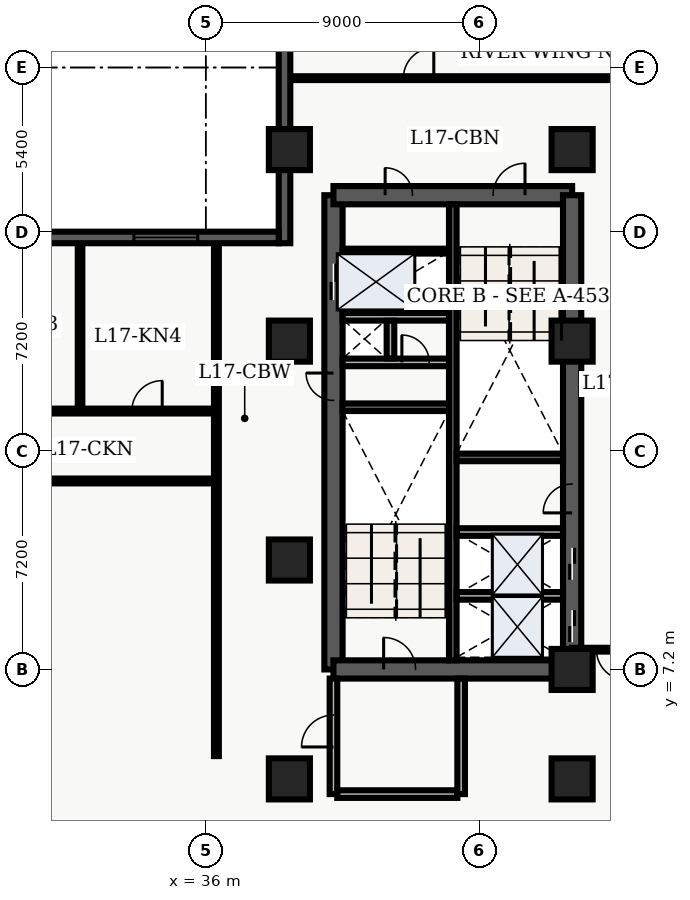
"""IFC4 building model, lengths in metres.
Left out: names, types, materials, properties, quantities, classifications, styles, units other than length and angle.
Written with IfcOpenShell. Run it as: python <this file> out.ifc"""

import sys

from ifc_helpers import new_model, entity, si_unit, converted_unit, direction, frame, origin_with_axes, origin_2d_with_axis, place, context, subcontext, project, spatial, polyline, rectangle, outline, extrude, element, fill, save


model = new_model("IFC4")
c1 = context("Model", 3, precision=1e-05, world=origin_with_axes(), true_north=direction((0.0, 1.0)))
c2 = subcontext(c1, "Body", "Model", "MODEL_VIEW")
j1 = project(units=[si_unit("LENGTHUNIT", "METRE"), converted_unit("PLANEANGLEUNIT", "DEGREE", entity("IfcPlaneAngleMeasure", 0.017), si_unit("PLANEANGLEUNIT", "RADIAN"), dimensions=[0, 0, 0, 0, 0, 0, 0])], contexts=[c1])
p1 = place(None, origin_with_axes())
s1 = spatial("IfcSite", under=j1, at=p1, CompositionType="ELEMENT")
p2 = place(p1, origin_with_axes())
s2 = spatial("IfcBuilding", under=s1, at=p2, CompositionType="ELEMENT")
p3 = place(p2, frame((0.0, 0.0, 71.7), z_axis=(0.0, 0.0, 1.0), x_axis=(1.0, 0.0, 0.0)))
s3 = spatial("IfcBuildingStorey", under=s2, at=p3, CompositionType="ELEMENT", Elevation=71.7)
p4 = place(p3, frame((40.2, 7.2, 0.0), z_axis=(0.0, 0.0, 1.0), x_axis=(0.0, 1.0, 0.0)))
e1 = element("IfcWall", 1, at=p4, inside=s3, PredefinedType="SHEAR", context=c2, shape_type="SweptSolid", body=[
    extrude(outline(polyline([(0.0, -0.3), (15.6, -0.3), (15.6, 0.3), (0.0, 0.3), (0.0, -0.3)])), origin_with_axes(), (0.0, 0.0, 1.0), 3.66),
])
p5 = place(p4, frame((12.75, 0.0, 0.0), z_axis=(0.0, 0.0, 1.0), x_axis=(1.0, 0.0, 0.0)))
e2 = element("IfcOpeningElement", 2, at=p5, cuts=e1, PredefinedType="OPENING", context=c2, shape_type="SweptSolid", body=[
    extrude(rectangle(XDim=1.2, YDim=0.62, at=origin_2d_with_axis()), origin_with_axes(), (0.0, 0.0, 1.0), 2.15),
])
p6 = place(p4, frame((9.3, 0.0, 0.0), z_axis=(0.0, 0.0, 1.0), x_axis=(1.0, 0.0, 0.0)))
e3 = element("IfcOpeningElement", 3, at=p6, cuts=e1, PredefinedType="OPENING", context=c2, shape_type="SweptSolid", body=[
    extrude(rectangle(XDim=0.9, YDim=0.62, at=origin_2d_with_axis()), origin_with_axes(), (0.0, 0.0, 1.0), 2.15),
])
p7 = place(p3, frame((40.2, 7.2, 0.0), z_axis=(0.0, 0.0, 1.0), x_axis=(1.0, 0.0, 0.0)))
e4 = element("IfcWall", 4, at=p7, inside=s3, PredefinedType="SHEAR", context=c2, shape_type="SweptSolid", body=[
    extrude(outline(polyline([(0.0, -0.3), (7.85, -0.3), (7.85, 0.3), (0.0, 0.3), (0.0, -0.3)])), origin_with_axes(), (0.0, 0.0, 1.0), 3.66),
])
p8 = place(p7, frame((2.175, 0.0, 0.0), z_axis=(0.0, 0.0, 1.0), x_axis=(1.0, 0.0, 0.0)))
e5 = element("IfcOpeningElement", 5, at=p8, cuts=e4, PredefinedType="OPENING", context=c2, shape_type="SweptSolid", body=[
    extrude(rectangle(XDim=1.05, YDim=0.62, at=origin_2d_with_axis()), origin_with_axes(), (0.0, 0.0, 1.0), 2.15),
])
p9 = place(p3, frame((40.2, 22.8, 0.0), z_axis=(0.0, 0.0, 1.0), x_axis=(1.0, 0.0, 0.0)))
e6 = element("IfcWall", 6, at=p9, inside=s3, PredefinedType="SHEAR", context=c2, shape_type="SweptSolid", body=[
    extrude(outline(polyline([(0.0, -0.3), (7.85, -0.3), (7.85, 0.3), (0.0, 0.3), (0.0, -0.3)])), origin_with_axes(), (0.0, 0.0, 1.0), 3.66),
])
p10 = place(p9, frame((5.775, 0.0, 0.0), z_axis=(0.0, 0.0, 1.0), x_axis=(1.0, 0.0, 0.0)))
e7 = element("IfcOpeningElement", 7, at=p10, cuts=e6, PredefinedType="OPENING", context=c2, shape_type="SweptSolid", body=[
    extrude(rectangle(XDim=1.05, YDim=0.62, at=origin_2d_with_axis()), origin_with_axes(), (0.0, 0.0, 1.0), 2.15),
])
p11 = place(p9, frame((2.15, 0.0, 0.0), z_axis=(0.0, 0.0, 1.0), x_axis=(1.0, 0.0, 0.0)))
e8 = element("IfcOpeningElement", 8, at=p11, cuts=e6, PredefinedType="OPENING", context=c2, shape_type="SweptSolid", body=[
    extrude(rectangle(XDim=0.9, YDim=0.62, at=origin_2d_with_axis()), origin_with_axes(), (0.0, 0.0, 1.0), 2.15),
])
p12 = place(p3, frame((48.05, 7.2, 0.0), z_axis=(0.0, 0.0, 1.0), x_axis=(0.0, 1.0, 0.0)))
e9 = element("IfcWall", 9, at=p12, inside=s3, PredefinedType="SHEAR", context=c2, shape_type="SweptSolid", body=[
    extrude(outline(polyline([(0.0, -0.3), (15.6, -0.3), (15.6, 0.3), (0.0, 0.3), (0.0, -0.3)])), origin_with_axes(), (0.0, 0.0, 1.0), 3.66),
])
p13 = place(p12, frame((1.425, 0.0, 0.0), z_axis=(0.0, 0.0, 1.0), x_axis=(1.0, 0.0, 0.0)))
e10 = element("IfcOpeningElement", 10, at=p13, cuts=e9, PredefinedType="OPENING", context=c2, shape_type="SweptSolid", body=[
    extrude(rectangle(XDim=1.05, YDim=0.62, at=origin_2d_with_axis()), origin_with_axes(), (0.0, 0.0, 1.0), 2.15),
])
p14 = place(p12, frame((3.475, 0.0, 0.0), z_axis=(0.0, 0.0, 1.0), x_axis=(1.0, 0.0, 0.0)))
e11 = element("IfcOpeningElement", 11, at=p14, cuts=e9, PredefinedType="OPENING", context=c2, shape_type="SweptSolid", body=[
    extrude(rectangle(XDim=1.05, YDim=0.62, at=origin_2d_with_axis()), origin_with_axes(), (0.0, 0.0, 1.0), 2.15),
])
p15 = place(p12, frame((5.625, 0.0, 0.0), z_axis=(0.0, 0.0, 1.0), x_axis=(1.0, 0.0, 0.0)))
e12 = element("IfcOpeningElement", 12, at=p15, cuts=e9, PredefinedType="OPENING", context=c2, shape_type="SweptSolid", body=[
    extrude(rectangle(XDim=0.95, YDim=0.62, at=origin_2d_with_axis()), origin_with_axes(), (0.0, 0.0, 1.0), 2.15),
])
p16 = place(p3, frame((44.125, 7.5, 0.0), z_axis=(0.0, 0.0, 1.0), x_axis=(0.0, 1.0, 0.0)))
e13 = element("IfcWall", 13, at=p16, inside=s3, PredefinedType="SHEAR", context=c2, shape_type="SweptSolid", body=[
    extrude(outline(polyline([(0.0, -0.125), (15.0, -0.125), (15.0, 0.125), (0.0, 0.125), (0.0, -0.125)])), origin_with_axes(), (0.0, 0.0, 1.0), 3.66),
])
for number, where, z_axis, x_axis in (
    (14, (40.5, 15.825, 0.0), (0.0, 0.0, 1.0), (1.0, 0.0, 0.0)),
    (15, (44.25, 14.175, 0.0), (0.0, 0.0, 1.0), (1.0, 0.0, 0.0)),
):
    element("IfcWall", number, at=place(p3, frame(where, z_axis=z_axis, x_axis=x_axis)), inside=s3, PredefinedType="SHEAR", context=c2, shape_type="SweptSolid", body=[
        extrude(outline(polyline([(0.0, -0.125), (3.5, -0.125), (3.5, 0.125), (0.0, 0.125), (0.0, -0.125)])), origin_with_axes(), (0.0, 0.0, 1.0), 3.66),
    ])
p17 = place(p3, frame((40.5, 17.3, 0.0), z_axis=(0.0, 0.0, 1.0), x_axis=(1.0, 0.0, 0.0)))
e16 = element("IfcWall", 16, at=p17, inside=s3, PredefinedType="SOLIDWALL", context=c2, shape_type="SweptSolid", body=[
    extrude(outline(polyline([(0.0, -0.125), (3.5, -0.125), (3.5, 0.125), (0.0, 0.125), (0.0, -0.125)])), origin_with_axes(), (0.0, 0.0, 1.0), 2.7),
])
p18 = place(p17, frame((2.4, 0.0, 0.0), z_axis=(0.0, 0.0, 1.0), x_axis=(1.0, 0.0, 0.0)))
e17 = element("IfcOpeningElement", 17, at=p18, cuts=e16, PredefinedType="OPENING", context=c2, shape_type="SweptSolid", body=[
    extrude(rectangle(XDim=0.9, YDim=0.27, at=origin_2d_with_axis()), origin_with_axes(), (0.0, 0.0, 1.0), 2.15),
])
p19 = place(p3, frame((40.5, 18.8, 0.0), z_axis=(0.0, 0.0, 1.0), x_axis=(1.0, 0.0, 0.0)))
e18 = element("IfcWall", 18, at=p19, inside=s3, PredefinedType="SOLIDWALL", context=c2, shape_type="SweptSolid", body=[
    extrude(outline(polyline([(0.0, -0.125), (3.5, -0.125), (3.5, 0.125), (0.0, 0.125), (0.0, -0.125)])), origin_with_axes(), (0.0, 0.0, 1.0), 2.7),
])
p20 = place(p3, frame((42.075, 17.43, 0.0), z_axis=(0.0, 0.0, 1.0), x_axis=(0.0, 1.0, 0.0)))
e19 = element("IfcWall", 19, at=p20, inside=s3, PredefinedType="SOLIDWALL", context=c2, shape_type="SweptSolid", body=[
    extrude(outline(polyline([(0.0, -0.125), (1.24, -0.125), (1.24, 0.125), (0.0, 0.125), (0.0, -0.125)])), origin_with_axes(), (0.0, 0.0, 1.0), 2.7),
])
p21 = place(p3, frame((40.2, 3.1, 0.0), z_axis=(0.0, 0.0, 1.0), x_axis=(0.0, 1.0, 0.0)))
e20 = element("IfcWall", 20, at=p21, inside=s3, PredefinedType="SOLIDWALL", context=c2, shape_type="SweptSolid", body=[
    extrude(outline(polyline([(0.0, -0.125), (3.8, -0.125), (3.8, 0.125), (0.0, 0.125), (0.0, -0.125)])), origin_with_axes(), (0.0, 0.0, 1.0), 2.7),
])
p22 = place(p21, frame((2.075, 0.0, 0.0), z_axis=(0.0, 0.0, 1.0), x_axis=(1.0, 0.0, 0.0)))
e21 = element("IfcOpeningElement", 21, at=p22, cuts=e20, PredefinedType="OPENING", context=c2, shape_type="SweptSolid", body=[
    extrude(rectangle(XDim=1.05, YDim=0.27, at=origin_2d_with_axis()), origin_with_axes(), (0.0, 0.0, 1.0), 2.15),
])
p23 = place(p3, frame((40.325, 3.1, 0.0), z_axis=(0.0, 0.0, 1.0), x_axis=(1.0, 0.0, 0.0)))
e22 = element("IfcWall", 22, at=p23, inside=s3, PredefinedType="SOLIDWALL", context=c2, shape_type="SweptSolid", body=[
    extrude(outline(polyline([(0.0, -0.125), (3.95, -0.125), (3.95, 0.125), (0.0, 0.125), (0.0, -0.125)])), origin_with_axes(), (0.0, 0.0, 1.0), 2.7),
])
p24 = place(p3, frame((44.4, 3.1, 0.0), z_axis=(0.0, 0.0, 1.0), x_axis=(0.0, 1.0, 0.0)))
e23 = element("IfcWall", 23, at=p24, inside=s3, PredefinedType="SOLIDWALL", context=c2, shape_type="SweptSolid", body=[
    extrude(outline(polyline([(0.0, -0.125), (3.8, -0.125), (3.8, 0.125), (0.0, 0.125), (0.0, -0.125)])), origin_with_axes(), (0.0, 0.0, 1.0), 2.7),
])
for number, where, z_axis, x_axis in (
    (24, (38.75, 3.6, 0.0), (0.0, 0.0, 1.0), (1.0, 0.0, 0.0)),
    (25, (38.75, 10.8, 0.0), (0.0, 0.0, 1.0), (1.0, 0.0, 0.0)),
    (26, (38.75, 18.0, 0.0), (0.0, 0.0, 1.0), (1.0, 0.0, 0.0)),
    (27, (38.75, 24.3, 0.0), (0.0, 0.0, 1.0), (1.0, 0.0, 0.0)),
    (28, (48.05, 3.6, 0.0), (0.0, 0.0, 1.0), (1.0, 0.0, 0.0)),
    (29, (48.05, 7.2, 0.0), (0.0, 0.0, 1.0), (1.0, 0.0, 0.0)),
    (30, (48.05, 18.0, 0.0), (0.0, 0.0, 1.0), (1.0, 0.0, 0.0)),
    (31, (48.05, 24.3, 0.0), (0.0, 0.0, 1.0), (1.0, 0.0, 0.0)),
):
    element("IfcColumn", number, at=place(p3, frame(where, z_axis=z_axis, x_axis=x_axis)), inside=s3, PredefinedType="COLUMN", context=c2, shape_type="SweptSolid", body=[
        extrude(rectangle(XDim=1.35, YDim=1.35, at=origin_2d_with_axis()), origin_with_axes(), (0.0, 0.0, 1.0), 3.9),
    ])
p25 = place(p3, frame((40.5, 20.96, 0.0), z_axis=(0.0, 0.0, 1.0), x_axis=(1.0, 0.0, 0.0)))
e32 = element("IfcWall", 32, at=p25, inside=s3, PredefinedType="PARTITIONING", context=c2, shape_type="SweptSolid", body=[
    extrude(outline(polyline([(0.0, -0.08), (3.5, -0.08), (3.5, 0.08), (0.0, 0.08), (0.0, -0.08)])), origin_with_axes(), (0.0, 0.0, 1.0), 2.7),
])
for number, where, z_axis, x_axis in (
    (33, (44.25, 9.62, 0.0), (0.0, 0.0, 1.0), (1.0, 0.0, 0.0)),
    (34, (44.25, 11.72, 0.0), (0.0, 0.0, 1.0), (1.0, 0.0, 0.0)),
):
    element("IfcWall", number, at=place(p3, frame(where, z_axis=z_axis, x_axis=x_axis)), inside=s3, PredefinedType="SOLIDWALL", context=c2, shape_type="SweptSolid", body=[
        extrude(outline(polyline([(0.0, -0.125), (3.5, -0.125), (3.5, 0.125), (0.0, 0.125), (0.0, -0.125)])), origin_with_axes(), (0.0, 0.0, 1.0), 2.7),
    ])
p26 = place(p3, frame((21.15, 13.4, 0.0), z_axis=(0.0, 0.0, 1.0), x_axis=(1.0, 0.0, 0.0)))
e35 = element("IfcWall", 35, at=p26, inside=s3, PredefinedType="PARTITIONING", context=c2, shape_type="SweptSolid", body=[
    extrude(outline(polyline([(0.0, -0.08), (15.2, -0.08), (15.2, 0.08), (0.0, 0.08), (0.0, -0.08)])), origin_with_axes(), (0.0, 0.0, 1.0), 2.7),
])
p27 = place(p26, frame((7.65, 0.0, 0.0), z_axis=(0.0, 0.0, 1.0), x_axis=(1.0, 0.0, 0.0)))
e36 = element("IfcOpeningElement", 36, at=p27, cuts=e35, PredefinedType="OPENING", context=c2, shape_type="SweptSolid", body=[
    extrude(rectangle(XDim=1.0, YDim=0.18, at=origin_2d_with_axis()), origin_with_axes(), (0.0, 0.0, 1.0), 2.15),
])
p28 = place(p3, frame((21.15, 15.7, 0.0), z_axis=(0.0, 0.0, 1.0), x_axis=(1.0, 0.0, 0.0)))
e37 = element("IfcWall", 37, at=p28, inside=s3, PredefinedType="PARTITIONING", context=c2, shape_type="SweptSolid", body=[
    extrude(outline(polyline([(0.0, -0.08), (15.2, -0.08), (15.2, 0.08), (0.0, 0.08), (0.0, -0.08)])), origin_with_axes(), (0.0, 0.0, 1.0), 2.7),
])
p29 = place(p28, frame((1.78, 0.0, 0.0), z_axis=(0.0, 0.0, 1.0), x_axis=(1.0, 0.0, 0.0)))
e38 = element("IfcOpeningElement", 38, at=p29, cuts=e37, PredefinedType="OPENING", context=c2, shape_type="SweptSolid", body=[
    extrude(rectangle(XDim=1.0, YDim=0.18, at=origin_2d_with_axis()), origin_with_axes(), (0.0, 0.0, 1.0), 2.15),
])
p30 = place(p28, frame((4.915, 0.0, 0.0), z_axis=(0.0, 0.0, 1.0), x_axis=(1.0, 0.0, 0.0)))
e39 = element("IfcOpeningElement", 39, at=p30, cuts=e37, PredefinedType="OPENING", context=c2, shape_type="SweptSolid", body=[
    extrude(rectangle(XDim=1.0, YDim=0.18, at=origin_2d_with_axis()), origin_with_axes(), (0.0, 0.0, 1.0), 2.15),
])
p31 = place(p28, frame((8.582, 0.0, 0.0), z_axis=(0.0, 0.0, 1.0), x_axis=(1.0, 0.0, 0.0)))
e40 = element("IfcOpeningElement", 40, at=p31, cuts=e37, PredefinedType="OPENING", context=c2, shape_type="SweptSolid", body=[
    extrude(rectangle(XDim=1.0, YDim=0.18, at=origin_2d_with_axis()), origin_with_axes(), (0.0, 0.0, 1.0), 2.15),
])
p32 = place(p28, frame((12.918, 0.0, 0.0), z_axis=(0.0, 0.0, 1.0), x_axis=(1.0, 0.0, 0.0)))
e41 = element("IfcOpeningElement", 41, at=p32, cuts=e37, PredefinedType="OPENING", context=c2, shape_type="SweptSolid", body=[
    extrude(rectangle(XDim=1.0, YDim=0.18, at=origin_2d_with_axis()), origin_with_axes(), (0.0, 0.0, 1.0), 2.15),
])
p33 = place(p3, frame((36.35, 4.35, 0.0), z_axis=(0.0, 0.0, 1.0), x_axis=(0.0, 1.0, 0.0)))
e42 = element("IfcWall", 42, at=p33, inside=s3, PredefinedType="PARTITIONING", context=c2, shape_type="SweptSolid", body=[
    extrude(outline(polyline([(0.0, -0.08), (16.95, -0.08), (16.95, 0.08), (0.0, 0.08), (0.0, -0.08)])), origin_with_axes(), (0.0, 0.0, 1.0), 2.7),
])
p34 = place(p3, frame((31.865, 15.82, 0.0), z_axis=(0.0, 0.0, 1.0), x_axis=(0.0, 1.0, 0.0)))
e43 = element("IfcWall", 43, at=p34, inside=s3, PredefinedType="PARTITIONING", context=c2, shape_type="SweptSolid", body=[
    extrude(outline(polyline([(0.0, -0.075), (5.405, -0.075), (5.405, 0.075), (0.0, 0.075), (0.0, -0.075)])), origin_with_axes(), (0.0, 0.0, 1.0), 2.7),
])
p35 = place(p3, frame((59.64, 7.85, 0.0), z_axis=(0.0, 0.0, 1.0), x_axis=(-1.0, 0.0, 0.0)))
e44 = element("IfcWall", 44, at=p35, inside=s3, PredefinedType="PARTITIONING", context=c2, shape_type="SweptSolid", body=[
    extrude(outline(polyline([(0.0, -0.062), (11.59, -0.062), (11.59, 0.062), (0.0, 0.062), (0.0, -0.062)])), origin_with_axes(), (0.0, 0.0, 1.0), 2.7),
])
p36 = place(p35, frame((10.29, 0.0, 0.0), z_axis=(0.0, 0.0, 1.0), x_axis=(1.0, 0.0, 0.0)))
e45 = element("IfcOpeningElement", 45, at=p36, cuts=e44, PredefinedType="OPENING", context=c2, shape_type="SweptSolid", body=[
    extrude(rectangle(XDim=1.0, YDim=0.145, at=origin_2d_with_axis()), origin_with_axes(), (0.0, 0.0, 1.0), 2.15),
])
p37 = place(p3, frame((38.76, 26.65, 0.0), z_axis=(0.0, 0.0, 1.0), x_axis=(1.0, 0.0, 0.0)))
e46 = element("IfcWall", 46, at=p37, inside=s3, PredefinedType="PARTITIONING", context=c2, shape_type="SweptSolid", body=[
    extrude(outline(polyline([(0.0, -0.062), (20.88, -0.062), (20.88, 0.062), (0.0, 0.062), (0.0, -0.062)])), origin_with_axes(), (0.0, 0.0, 1.0), 2.7),
])
p38 = place(p37, frame((4.24, 0.0, 0.0), z_axis=(0.0, 0.0, 1.0), x_axis=(1.0, 0.0, 0.0)))
e47 = element("IfcOpeningElement", 47, at=p38, cuts=e46, PredefinedType="OPENING", context=c2, shape_type="SweptSolid", body=[
    extrude(rectangle(XDim=1.0, YDim=0.145, at=origin_2d_with_axis()), origin_with_axes(), (0.0, 0.0, 1.0), 2.15),
])
p39 = place(p3, frame((38.59, 21.22, 0.0), z_axis=(0.0, 0.0, 1.0), x_axis=(0.0, 1.0, 0.0)))
e48 = element("IfcWall", 48, at=p39, inside=s3, PredefinedType="SOLIDWALL", context=c2, shape_type="SweptSolid", body=[
    extrude(outline(polyline([(0.0, -0.19), (7.58, -0.19), (7.58, 0.19), (0.0, 0.19), (0.0, -0.19)])), origin_with_axes(), (0.0, 0.0, 1.0), 3.66),
])
p40 = place(p3, frame((21.22, 21.41, 0.0), z_axis=(0.0, 0.0, 1.0), x_axis=(1.0, 0.0, 0.0)))
e49 = element("IfcWall", 49, at=p40, inside=s3, PredefinedType="SOLIDWALL", context=c2, shape_type="SweptSolid", body=[
    extrude(outline(polyline([(0.0, -0.19), (17.18, -0.19), (17.18, 0.19), (0.0, 0.19), (0.0, -0.19)])), origin_with_axes(), (0.0, 0.0, 1.0), 3.66),
])
p41 = place(p40, frame((8.59, 0.0, 0.45), z_axis=(0.0, 0.0, 1.0), x_axis=(1.0, 0.0, 0.0)))
e50 = element("IfcOpeningElement", 50, at=p41, cuts=e49, PredefinedType="OPENING", context=c2, shape_type="SweptSolid", body=[
    extrude(rectangle(XDim=2.1, YDim=0.4, at=origin_2d_with_axis()), origin_with_axes(), (0.0, 0.0, 1.0), 2.2),
])
p42 = place(p40, frame((13.467, 0.0, 0.45), z_axis=(0.0, 0.0, 1.0), x_axis=(1.0, 0.0, 0.0)))
e51 = element("IfcOpeningElement", 51, at=p42, cuts=e49, PredefinedType="OPENING", context=c2, shape_type="SweptSolid", body=[
    extrude(rectangle(XDim=2.1, YDim=0.4, at=origin_2d_with_axis()), origin_with_axes(), (0.0, 0.0, 1.0), 2.2),
])
p43 = place(p12, frame((1.425, 0.0, 0.0), z_axis=(0.0, 0.0, 1.0), x_axis=(1.0, 0.0, 0.0)))
e52 = element("IfcDoor", 52, at=p43, inside=s3, OperationType="SLIDING_TO_LEFT", PredefinedType="DOOR", context=c2, shape_type="SweptSolid", body=[
    extrude(rectangle(XDim=1.05, YDim=0.09, at=origin_2d_with_axis()), origin_with_axes(), (0.0, 0.0, 1.0), 2.15),
])
fill(e10, e52)
p44 = place(p12, frame((3.475, 0.0, 0.0), z_axis=(0.0, 0.0, 1.0), x_axis=(1.0, 0.0, 0.0)))
e53 = element("IfcDoor", 53, at=p44, inside=s3, OperationType="SLIDING_TO_RIGHT", PredefinedType="DOOR", context=c2, shape_type="SweptSolid", body=[
    extrude(rectangle(XDim=1.05, YDim=0.09, at=origin_2d_with_axis()), origin_with_axes(), (0.0, 0.0, 1.0), 2.15),
])
fill(e11, e53)
p45 = place(p4, frame((12.75, 0.0, 0.0), z_axis=(0.0, 0.0, 1.0), x_axis=(1.0, 0.0, 0.0)))
e54 = element("IfcDoor", 54, at=p45, inside=s3, OperationType="DOUBLE_DOOR_SLIDING", PredefinedType="DOOR", context=c2, shape_type="SweptSolid", body=[
    extrude(rectangle(XDim=1.2, YDim=0.09, at=origin_2d_with_axis()), origin_with_axes(), (0.0, 0.0, 1.0), 2.15),
])
fill(e2, e54)
p46 = place(p4, frame((9.3, 0.0, 0.0), z_axis=(0.0, 0.0, 1.0), x_axis=(1.0, 0.0, 0.0)))
e55 = element("IfcDoor", 55, at=p46, inside=s3, OperationType="SINGLE_SWING_RIGHT", PredefinedType="DOOR", context=c2, shape_type="SweptSolid", body=[
    extrude(rectangle(XDim=0.9, YDim=0.09, at=origin_2d_with_axis()), origin_with_axes(), (0.0, 0.0, 1.0), 2.15),
])
fill(e3, e55)
p47 = place(p17, frame((2.4, 0.0, 0.0), z_axis=(0.0, 0.0, 1.0), x_axis=(1.0, 0.0, 0.0)))
e56 = element("IfcDoor", 56, at=p47, inside=s3, OperationType="SINGLE_SWING_LEFT", PredefinedType="DOOR", context=c2, shape_type="SweptSolid", body=[
    extrude(rectangle(XDim=0.9, YDim=0.09, at=origin_2d_with_axis()), origin_with_axes(), (0.0, 0.0, 1.0), 2.15),
])
fill(e17, e56)
p48 = place(p7, frame((2.175, 0.0, 0.0), z_axis=(0.0, 0.0, 1.0), x_axis=(1.0, 0.0, 0.0)))
e57 = element("IfcDoor", 57, at=p48, inside=s3, OperationType="SINGLE_SWING_LEFT", PredefinedType="DOOR", context=c2, shape_type="SweptSolid", body=[
    extrude(rectangle(XDim=1.05, YDim=0.09, at=origin_2d_with_axis()), origin_with_axes(), (0.0, 0.0, 1.0), 2.15),
])
fill(e5, e57)
p49 = place(p9, frame((5.775, 0.0, 0.0), z_axis=(0.0, 0.0, 1.0), x_axis=(1.0, 0.0, 0.0)))
e58 = element("IfcDoor", 58, at=p49, inside=s3, OperationType="SINGLE_SWING_RIGHT", PredefinedType="DOOR", context=c2, shape_type="SweptSolid", body=[
    extrude(rectangle(XDim=1.05, YDim=0.09, at=origin_2d_with_axis()), origin_with_axes(), (0.0, 0.0, 1.0), 2.15),
])
fill(e7, e58)
p50 = place(p21, frame((2.075, 0.0, 0.0), z_axis=(0.0, 0.0, 1.0), x_axis=(1.0, 0.0, 0.0)))
e59 = element("IfcDoor", 59, at=p50, inside=s3, OperationType="SINGLE_SWING_LEFT", PredefinedType="DOOR", context=c2, shape_type="SweptSolid", body=[
    extrude(rectangle(XDim=1.05, YDim=0.09, at=origin_2d_with_axis()), origin_with_axes(), (0.0, 0.0, 1.0), 2.15),
])
fill(e21, e59)
p51 = place(p9, frame((2.15, 0.0, 0.0), z_axis=(0.0, 0.0, 1.0), x_axis=(1.0, 0.0, 0.0)))
e60 = element("IfcDoor", 60, at=p51, inside=s3, OperationType="SINGLE_SWING_LEFT", PredefinedType="DOOR", context=c2, shape_type="SweptSolid", body=[
    extrude(rectangle(XDim=0.9, YDim=0.09, at=origin_2d_with_axis()), origin_with_axes(), (0.0, 0.0, 1.0), 2.15),
])
fill(e8, e60)
p52 = place(p12, frame((5.625, 0.0, 0.0), z_axis=(0.0, 0.0, 1.0), x_axis=(1.0, 0.0, 0.0)))
e61 = element("IfcDoor", 61, at=p52, inside=s3, OperationType="SINGLE_SWING_LEFT", PredefinedType="DOOR", context=c2, shape_type="SweptSolid", body=[
    extrude(rectangle(XDim=0.95, YDim=0.09, at=origin_2d_with_axis()), origin_with_axes(), (0.0, 0.0, 1.0), 2.15),
])
fill(e12, e61)
p53 = place(p28, frame((12.918, 0.0, 0.0), z_axis=(0.0, 0.0, 1.0), x_axis=(1.0, 0.0, 0.0)))
e62 = element("IfcDoor", 62, at=p53, inside=s3, OperationType="SINGLE_SWING_RIGHT", PredefinedType="DOOR", context=c2, shape_type="SweptSolid", body=[
    extrude(rectangle(XDim=1.0, YDim=0.09, at=origin_2d_with_axis()), origin_with_axes(), (0.0, 0.0, 1.0), 2.15),
])
fill(e41, e62)
p54 = place(p35, frame((10.29, 0.0, 0.0), z_axis=(0.0, 0.0, 1.0), x_axis=(1.0, 0.0, 0.0)))
e63 = element("IfcDoor", 63, at=p54, inside=s3, OperationType="SINGLE_SWING_LEFT", PredefinedType="DOOR", context=c2, shape_type="SweptSolid", body=[
    extrude(rectangle(XDim=1.0, YDim=0.075, at=origin_2d_with_axis()), origin_with_axes(), (0.0, 0.0, 1.0), 2.15),
])
fill(e45, e63)
p55 = place(p37, frame((4.24, 0.0, 0.0), z_axis=(0.0, 0.0, 1.0), x_axis=(1.0, 0.0, 0.0)))
e64 = element("IfcDoor", 64, at=p55, inside=s3, OperationType="SINGLE_SWING_RIGHT", PredefinedType="DOOR", context=c2, shape_type="SweptSolid", body=[
    extrude(rectangle(XDim=1.0, YDim=0.075, at=origin_2d_with_axis()), origin_with_axes(), (0.0, 0.0, 1.0), 2.15),
])
fill(e47, e64)
p56 = place(p40, frame((13.467, 0.0, 0.45), z_axis=(0.0, 0.0, 1.0), x_axis=(1.0, 0.0, 0.0)))
e65 = element("IfcWindow", 65, at=p56, inside=s3, PredefinedType="WINDOW", context=c2, shape_type="SweptSolid", body=[
    extrude(rectangle(XDim=2.1, YDim=0.09, at=origin_2d_with_axis()), origin_with_axes(), (0.0, 0.0, 1.0), 2.2),
])
fill(e51, e65)
save(model, sys.argv[1])
